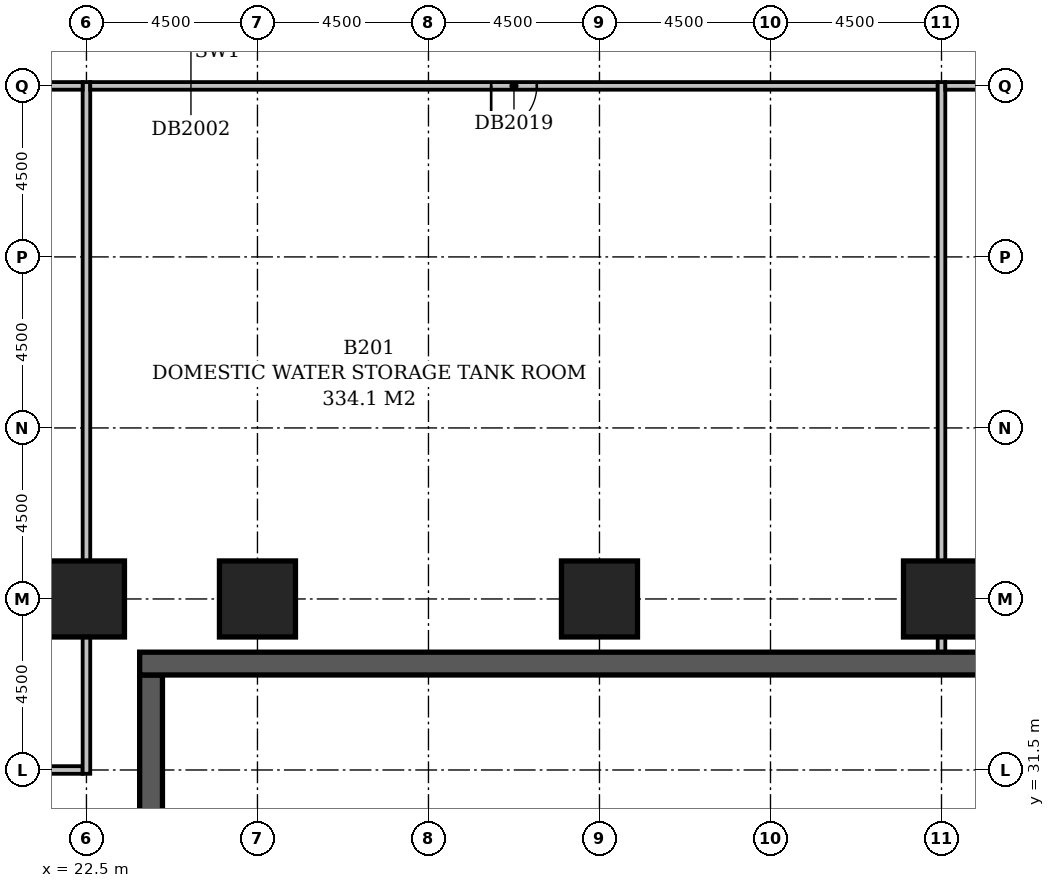
"""IFC4 building model, lengths in metres.
Left out: names, types, materials, properties, quantities, classifications, styles, units other than length and angle.
Written with IfcOpenShell. Run it as: python <this file> out.ifc"""

import sys

from ifc_helpers import new_model, si_unit, direction, frame, frame_2d, origin, origin_2d, place, context, subcontext, project, spatial, rectangle, extrude, element, fill, save


model = new_model("IFC4")
c1 = context("Model", 3, precision=1e-05, world=origin(), true_north=direction((0.0, 1.0)))
c2 = subcontext(c1, "Body", "Model", "MODEL_VIEW")
j1 = project(units=[si_unit("LENGTHUNIT", "METRE"), si_unit("PLANEANGLEUNIT", "RADIAN")], contexts=[c1])
p1 = place(None, origin())
s1 = spatial("IfcSite", under=j1, at=p1, CompositionType="ELEMENT")
p2 = place(p1, origin())
s2 = spatial("IfcBuilding", under=s1, at=p2, CompositionType="ELEMENT")
p3 = place(p2, frame((0.0, 0.0, -9.0)))
s3 = spatial("IfcBuildingStorey", under=s2, at=p3, CompositionType="ELEMENT", Elevation=-9.0)
for number, where, z_axis, x_axis in (
    (1, (22.5, 36.0, 0.0), (0.0, 0.0, 1.0), (1.0, 0.0, 0.0)),
    (2, (27.0, 36.0, 0.0), (0.0, 0.0, 1.0), (1.0, 0.0, 0.0)),
    (3, (36.0, 36.0, 0.0), (0.0, 0.0, 1.0), (1.0, 0.0, 0.0)),
    (4, (45.0, 36.0, 0.0), (0.0, 0.0, 1.0), (1.0, 0.0, 0.0)),
):
    element("IfcColumn", number, at=place(p3, frame(where, z_axis=z_axis, x_axis=x_axis)), inside=s3, PredefinedType="COLUMN", context=c2, shape_type="SweptSolid", body=[
        extrude(rectangle(XDim=2.0, YDim=2.0, at=origin_2d()), origin(), (0.0, 0.0, 1.0), 4.1),
    ])
p4 = place(p3, frame((69.5, 34.3, 0.0), z_axis=(0.0, 0.0, 1.0), x_axis=(-1.0, 0.0, 0.0)))
e5 = element("IfcWall", 5, at=p4, inside=s3, PredefinedType="SOLIDWALL", context=c2, shape_type="SweptSolid", body=[
    extrude(rectangle(XDim=45.6, YDim=0.6, at=frame_2d((22.8, 0.0))), origin(), (0.0, 0.0, 1.0), 4.1),
])
p5 = place(p3, frame((24.2, 34.0, 0.0), z_axis=(0.0, 0.0, 1.0), x_axis=(0.0, -1.0, 0.0)))
e6 = element("IfcWall", 6, at=p5, inside=s3, PredefinedType="SOLIDWALL", context=c2, shape_type="SweptSolid", body=[
    extrude(rectangle(XDim=17.4, YDim=0.6, at=frame_2d((8.7, 0.0))), origin(), (0.0, 0.0, 1.0), 4.1),
])
p6 = place(p3, frame((22.4, 31.5, 0.0), z_axis=(0.0, 0.0, 1.0), x_axis=(-1.0, 0.0, 0.0)))
e7 = element("IfcWall", 7, at=p6, inside=s3, PredefinedType="PARTITIONING", context=c2, shape_type="SweptSolid", body=[
    extrude(rectangle(XDim=13.3, YDim=0.2, at=frame_2d((6.65, 0.0))), origin(), (0.0, 0.0, 1.0), 4.1),
])
p7 = place(p3, frame((22.5, 31.4, 0.0), z_axis=(0.0, 0.0, 1.0), x_axis=(0.0, 1.0, 0.0)))
e8 = element("IfcWall", 8, at=p7, inside=s3, PredefinedType="PARTITIONING", context=c2, shape_type="SweptSolid", body=[
    extrude(rectangle(XDim=18.2, YDim=0.2, at=frame_2d((9.1, 0.0))), origin(), (0.0, 0.0, 1.0), 3.6),
])
p8 = place(p3, frame((8.9, 49.5, 0.0), z_axis=(0.0, 0.0, 1.0), x_axis=(1.0, 0.0, 0.0)))
e9 = element("IfcWall", 9, at=p8, inside=s3, PredefinedType="PARTITIONING", context=c2, shape_type="SweptSolid", body=[
    extrude(rectangle(XDim=13.5, YDim=0.2, at=frame_2d((6.75, 0.0))), origin(), (0.0, 0.0, 1.0), 4.1),
])
p9 = place(p3, frame((22.6, 49.5, 0.0), z_axis=(0.0, 0.0, 1.0), x_axis=(1.0, 0.0, 0.0)))
e10 = element("IfcWall", 10, at=p9, inside=s3, PredefinedType="PARTITIONING", context=c2, shape_type="SweptSolid", body=[
    extrude(rectangle(XDim=22.3, YDim=0.2, at=frame_2d((11.15, 0.0))), origin(), (0.0, 0.0, 1.0), 4.1),
])
p10 = place(p9, frame((10.55, 0.0, 0.0)))
e11 = element("IfcOpeningElement", 11, at=p10, cuts=e10, PredefinedType="OPENING", context=c2, shape_type="SweptSolid", body=[
    extrude(rectangle(XDim=1.2, YDim=2.1, at=frame_2d((0.6, 1.05))), frame((0.0, 0.112, 0.0), z_axis=(0.0, -1.0, 0.0), x_axis=(1.0, 0.0, 0.0)), (0.0, 0.0, 1.0), 0.224),
])
p11 = place(p3, frame((45.0, 49.6, 0.0), z_axis=(0.0, 0.0, 1.0), x_axis=(0.0, -1.0, 0.0)))
e12 = element("IfcWall", 12, at=p11, inside=s3, PredefinedType="PARTITIONING", context=c2, shape_type="SweptSolid", body=[
    extrude(rectangle(XDim=15.0, YDim=0.2, at=frame_2d((7.5, 0.0))), origin(), (0.0, 0.0, 1.0), 3.4),
])
p12 = place(p3, frame((45.1, 49.5, 0.0), z_axis=(0.0, 0.0, 1.0), x_axis=(1.0, 0.0, 0.0)))
e13 = element("IfcWall", 13, at=p12, inside=s3, PredefinedType="PARTITIONING", context=c2, shape_type="SweptSolid", body=[
    extrude(rectangle(XDim=22.4, YDim=0.2, at=frame_2d((11.2, 0.0))), origin(), (0.0, 0.0, 1.0), 4.1),
])
p13 = place(p12, frame((10.6, 0.0, 0.0)))
e14 = element("IfcOpeningElement", 14, at=p13, cuts=e13, PredefinedType="OPENING", context=c2, shape_type="SweptSolid", body=[
    extrude(rectangle(XDim=1.2, YDim=2.1, at=frame_2d((0.6, 1.05))), frame((0.0, 0.112, 0.0), z_axis=(0.0, -1.0, 0.0), x_axis=(1.0, 0.0, 0.0)), (0.0, 0.0, 1.0), 0.224),
])
p14 = place(p10, frame((1.2, 0.0, 0.0), z_axis=(0.0, 0.0, 1.0), x_axis=(-1.0, 0.0, 0.0)))
e15 = element("IfcDoor", 15, at=p14, inside=s3, OperationType="SINGLE_SWING_RIGHT", PredefinedType="DOOR", context=c2, shape_type="SweptSolid", body=[
    extrude(rectangle(XDim=1.2, YDim=2.1, at=frame_2d((0.6, 1.05))), frame((0.0, 0.025, 0.0), z_axis=(0.0, -1.0, 0.0), x_axis=(1.0, 0.0, 0.0)), (0.0, 0.0, 1.0), 0.05),
])
fill(e11, e15)
save(model, sys.argv[1])
